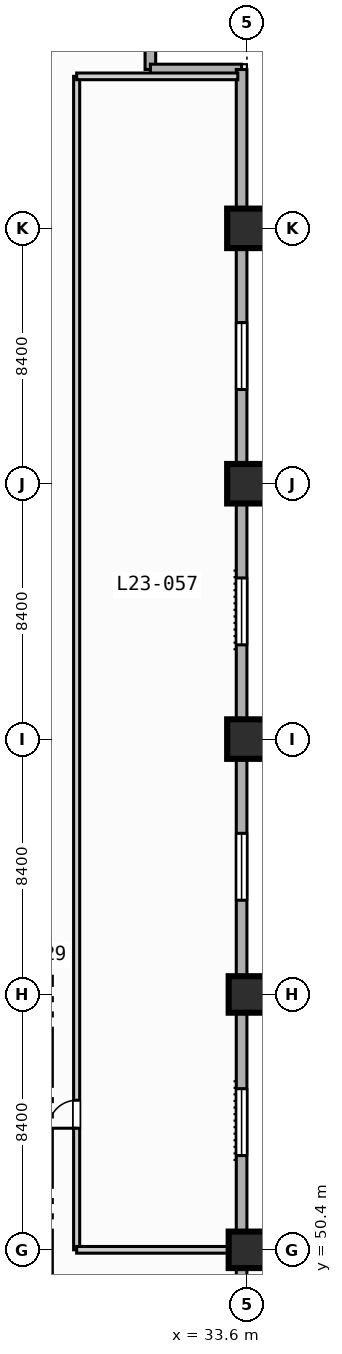
"""IFC4 building model, lengths in metres.
Left out: names, types, materials, properties, quantities, classifications, styles, units other than length and angle.
Written with IfcOpenShell. Run it as: python <this file> out.ifc"""

import sys

from ifc_helpers import new_model, si_unit, direction, frame, frame_2d, origin, origin_2d, place, context, subcontext, project, spatial, rectangle, extrude, element, fill, save


model = new_model("IFC4")
c1 = context("Model", 3, precision=1e-05, world=origin(), true_north=direction((0.0, 1.0)))
c2 = subcontext(c1, "Body", "Model", "MODEL_VIEW")
j1 = project(units=[si_unit("LENGTHUNIT", "METRE"), si_unit("PLANEANGLEUNIT", "RADIAN")], contexts=[c1])
p1 = place(None, origin())
s1 = spatial("IfcSite", under=j1, at=p1, CompositionType="ELEMENT")
p2 = place(p1, origin())
s2 = spatial("IfcBuilding", under=s1, at=p2, CompositionType="ELEMENT")
p3 = place(p2, frame((0.0, 0.0, 100.0)))
s3 = spatial("IfcBuildingStorey", under=s2, at=p3, CompositionType="ELEMENT", Elevation=100.0)
for number, where, z_axis, x_axis in (
    (1, (33.6, 50.4, 0.0), (0.0, 0.0, 1.0), (1.0, 0.0, 0.0)),
    (2, (33.6, 58.8, 0.0), (0.0, 0.0, 1.0), (1.0, 0.0, 0.0)),
):
    element("IfcColumn", number, at=place(p3, frame(where, z_axis=z_axis, x_axis=x_axis)), inside=s3, PredefinedType="COLUMN", context=c2, shape_type="SweptSolid", body=[
        extrude(rectangle(XDim=1.2, YDim=1.2, at=origin_2d()), origin(), (0.0, 0.0, 1.0), 3.8),
    ])
for number, where, z_axis, x_axis in (
    (3, (33.6, 67.2, 0.0), (0.0, 0.0, 1.0), (1.0, 0.0, 0.0)),
    (4, (33.6, 75.6, 0.0), (0.0, 0.0, 1.0), (1.0, 0.0, 0.0)),
    (5, (33.6, 84.0, 0.0), (0.0, 0.0, 1.0), (1.0, 0.0, 0.0)),
):
    element("IfcColumn", number, at=place(p3, frame(where, z_axis=z_axis, x_axis=x_axis)), inside=s3, PredefinedType="COLUMN", context=c2, shape_type="SweptSolid", body=[
        extrude(rectangle(XDim=1.3, YDim=1.3, at=origin_2d()), origin(), (0.0, 0.0, 1.0), 3.8),
    ])
for number, where, z_axis, x_axis in (
    (6, (30.425, 92.225, 0.0), (0.0, 0.0, 1.0), (0.0, -1.0, 0.0)),
    (7, (30.425, 89.225, 0.0), (0.0, 0.0, 1.0), (1.0, 0.0, 0.0)),
):
    element("IfcWall", number, at=place(p3, frame(where, z_axis=z_axis, x_axis=x_axis)), inside=s3, PredefinedType="STANDARD", context=c2, shape_type="SweptSolid", body=[
        extrude(rectangle(XDim=3.0, YDim=0.35, at=frame_2d((1.5, 0.0))), origin(), (0.0, 0.0, 1.0), 3.55),
    ])
p4 = place(p3, frame((33.425, 89.225, 0.0), z_axis=(0.0, 0.0, 1.0), x_axis=(0.0, -1.0, 0.0)))
e8 = element("IfcWall", 8, at=p4, inside=s3, PredefinedType="STANDARD", context=c2, shape_type="SweptSolid", body=[
    extrude(rectangle(XDim=55.8, YDim=0.35, at=frame_2d((27.9, 0.0))), origin(), (0.0, 0.0, 1.0), 3.55),
])
p5 = place(p4, frame((50.325, 0.0, 0.85)))
e9 = element("IfcOpeningElement", 9, at=p5, cuts=e8, PredefinedType="OPENING", context=c2, shape_type="SweptSolid", body=[
    extrude(rectangle(XDim=2.2, YDim=1.8, at=frame_2d((1.1, 0.9))), frame((0.0, 0.185, 0.0), z_axis=(0.0, -1.0, 0.0), x_axis=(1.0, 0.0, 0.0)), (0.0, 0.0, 1.0), 0.37),
])
p6 = place(p4, frame((33.525, 0.0, 0.85)))
e10 = element("IfcOpeningElement", 10, at=p6, cuts=e8, PredefinedType="OPENING", context=c2, shape_type="SweptSolid", body=[
    extrude(rectangle(XDim=2.2, YDim=1.8, at=frame_2d((1.1, 0.9))), frame((0.0, 0.185, 0.0), z_axis=(0.0, -1.0, 0.0), x_axis=(1.0, 0.0, 0.0)), (0.0, 0.0, 1.0), 0.37),
])
p7 = place(p4, frame((25.125, 0.0, 0.85)))
e11 = element("IfcOpeningElement", 11, at=p7, cuts=e8, PredefinedType="OPENING", context=c2, shape_type="SweptSolid", body=[
    extrude(rectangle(XDim=2.2, YDim=1.8, at=frame_2d((1.1, 0.9))), frame((0.0, 0.185, 0.0), z_axis=(0.0, -1.0, 0.0), x_axis=(1.0, 0.0, 0.0)), (0.0, 0.0, 1.0), 0.37),
])
p8 = place(p4, frame((16.725, 0.0, 0.85)))
e12 = element("IfcOpeningElement", 12, at=p8, cuts=e8, PredefinedType="OPENING", context=c2, shape_type="SweptSolid", body=[
    extrude(rectangle(XDim=2.2, YDim=1.8, at=frame_2d((1.1, 0.9))), frame((0.0, 0.185, 0.0), z_axis=(0.0, -1.0, 0.0), x_axis=(1.0, 0.0, 0.0)), (0.0, 0.0, 1.0), 0.37),
])
p9 = place(p4, frame((8.325, 0.0, 0.85)))
e13 = element("IfcOpeningElement", 13, at=p9, cuts=e8, PredefinedType="OPENING", context=c2, shape_type="SweptSolid", body=[
    extrude(rectangle(XDim=2.2, YDim=1.8, at=frame_2d((1.1, 0.9))), frame((0.0, 0.185, 0.0), z_axis=(0.0, -1.0, 0.0), x_axis=(1.0, 0.0, 0.0)), (0.0, 0.0, 1.0), 0.37),
])
p10 = place(p3, frame((28.0, 50.4, 0.0), z_axis=(0.0, 0.0, 1.0), x_axis=(0.0, 1.0, 0.0)))
e14 = element("IfcWall", 14, at=p10, inside=s3, PredefinedType="PARTITIONING", context=c2, shape_type="SweptSolid", body=[
    extrude(rectangle(XDim=38.6, YDim=0.2, at=frame_2d((19.3, 0.0))), origin(), (0.0, 0.0, 1.0), 3.55),
])
p11 = place(p10, frame((4.0, 0.0, 0.0)))
e15 = element("IfcOpeningElement", 15, at=p11, cuts=e14, PredefinedType="OPENING", context=c2, shape_type="SweptSolid", body=[
    extrude(rectangle(XDim=0.92, YDim=2.1, at=frame_2d((0.46, 1.05))), frame((0.0, 0.11, 0.0), z_axis=(0.0, -1.0, 0.0), x_axis=(1.0, 0.0, 0.0)), (0.0, 0.0, 1.0), 0.22),
])
p12 = place(p3, frame((28.0, 50.4, 0.0), z_axis=(0.0, 0.0, 1.0), x_axis=(1.0, 0.0, 0.0)))
e16 = element("IfcWall", 16, at=p12, inside=s3, PredefinedType="PARTITIONING", context=c2, shape_type="SweptSolid", body=[
    extrude(rectangle(XDim=5.3, YDim=0.22, at=frame_2d((2.65, 0.0))), origin(), (0.0, 0.0, 1.0), 2.8),
])
p13 = place(p3, frame((28.0, 89.0, 0.0), z_axis=(0.0, 0.0, 1.0), x_axis=(1.0, 0.0, 0.0)))
e17 = element("IfcWall", 17, at=p13, inside=s3, PredefinedType="PARTITIONING", context=c2, shape_type="SweptSolid", body=[
    extrude(rectangle(XDim=5.3, YDim=0.22, at=frame_2d((2.65, 0.0))), origin(), (0.0, 0.0, 1.0), 3.55),
])
p14 = place(p6, origin())
e18 = element("IfcWindow", 18, at=p14, inside=s3, PartitioningType="SINGLE_PANEL", PredefinedType="WINDOW", context=c2, shape_type="SweptSolid", body=[
    extrude(rectangle(XDim=2.2, YDim=1.8, at=frame_2d((1.1, 0.9))), frame((0.0, 0.03, 0.0), z_axis=(0.0, -1.0, 0.0), x_axis=(1.0, 0.0, 0.0)), (0.0, 0.0, 1.0), 0.06),
])
fill(e10, e18)
p15 = place(p7, origin())
e19 = element("IfcWindow", 19, at=p15, inside=s3, PartitioningType="SINGLE_PANEL", PredefinedType="WINDOW", context=c2, shape_type="SweptSolid", body=[
    extrude(rectangle(XDim=2.2, YDim=1.8, at=frame_2d((1.1, 0.9))), frame((0.0, 0.03, 0.0), z_axis=(0.0, -1.0, 0.0), x_axis=(1.0, 0.0, 0.0)), (0.0, 0.0, 1.0), 0.06),
])
fill(e11, e19)
p16 = place(p8, origin())
e20 = element("IfcWindow", 20, at=p16, inside=s3, PartitioningType="SINGLE_PANEL", PredefinedType="WINDOW", context=c2, shape_type="SweptSolid", body=[
    extrude(rectangle(XDim=2.2, YDim=1.8, at=frame_2d((1.1, 0.9))), frame((0.0, 0.03, 0.0), z_axis=(0.0, -1.0, 0.0), x_axis=(1.0, 0.0, 0.0)), (0.0, 0.0, 1.0), 0.06),
])
fill(e12, e20)
p17 = place(p9, origin())
e21 = element("IfcWindow", 21, at=p17, inside=s3, PartitioningType="SINGLE_PANEL", PredefinedType="WINDOW", context=c2, shape_type="SweptSolid", body=[
    extrude(rectangle(XDim=2.2, YDim=1.8, at=frame_2d((1.1, 0.9))), frame((0.0, 0.03, 0.0), z_axis=(0.0, -1.0, 0.0), x_axis=(1.0, 0.0, 0.0)), (0.0, 0.0, 1.0), 0.06),
])
fill(e13, e21)
p18 = place(p11, origin())
e22 = element("IfcDoor", 22, at=p18, inside=s3, OperationType="SINGLE_SWING_LEFT", PredefinedType="DOOR", context=c2, shape_type="SweptSolid", body=[
    extrude(rectangle(XDim=0.92, YDim=2.1, at=frame_2d((0.46, 1.05))), frame((0.0, 0.025, 0.0), z_axis=(0.0, -1.0, 0.0), x_axis=(1.0, 0.0, 0.0)), (0.0, 0.0, 1.0), 0.05),
])
fill(e15, e22)
save(model, sys.argv[1])
